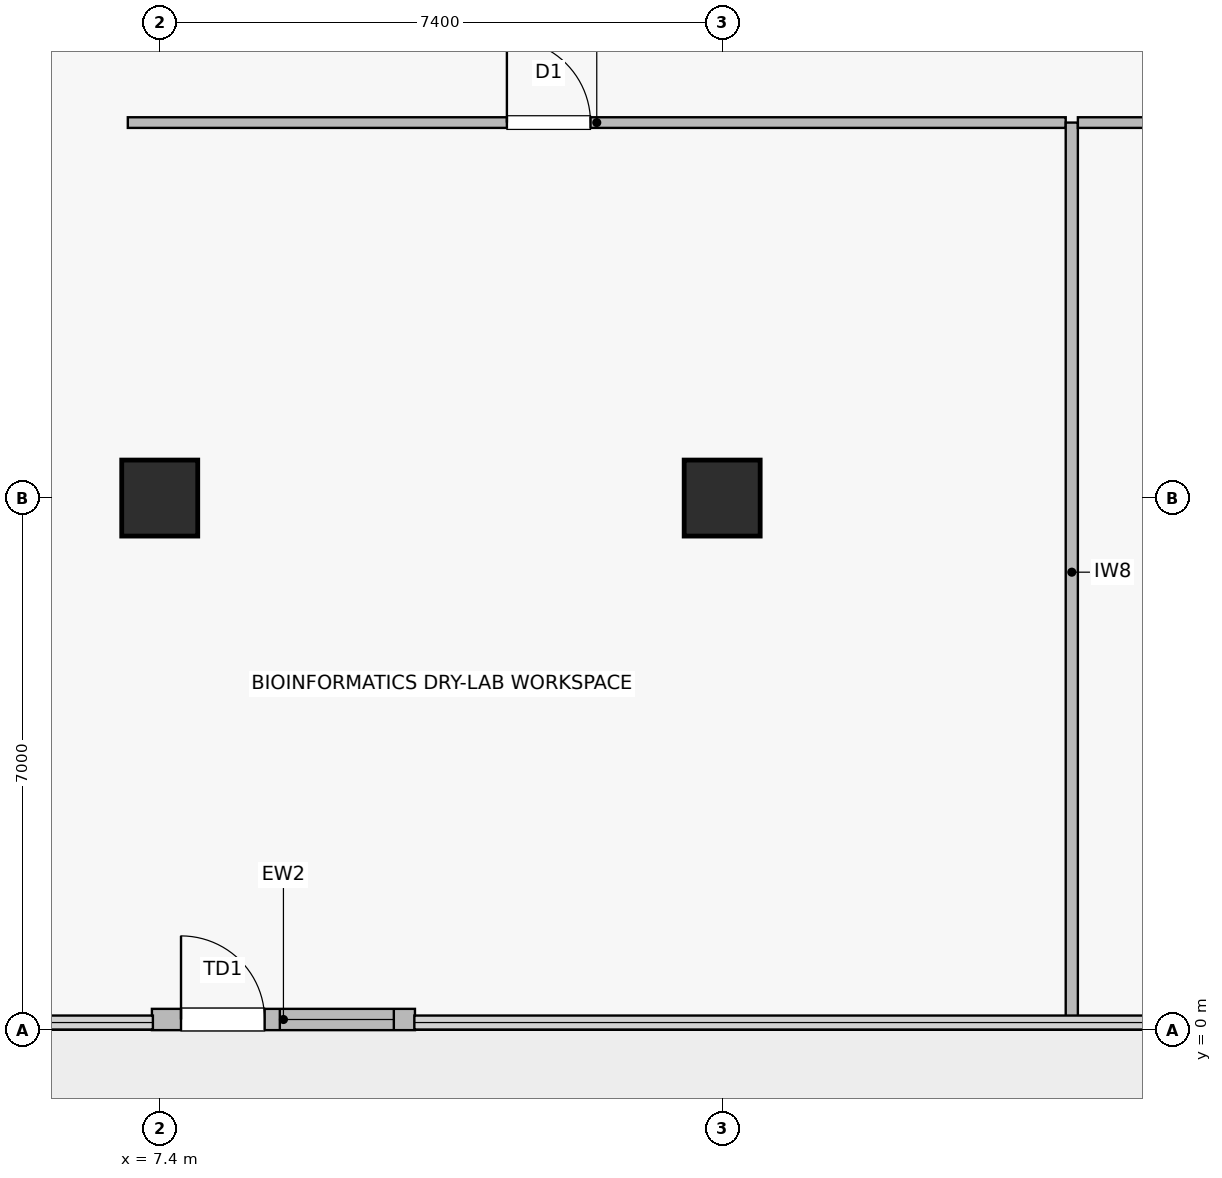
"""IFC4 building model, lengths in metres.
Left out: names, types, materials, properties, quantities, classifications, styles, units other than length and angle.
Written with IfcOpenShell. Run it as: python <this file> out.ifc"""

import sys

from ifc_helpers import new_model, si_unit, direction, frame, frame_2d, origin, origin_2d, place, context, subcontext, project, spatial, rectangle, extrude, source, transform, mapped, element, fill, save


model = new_model("IFC4")
c1 = context("Model", 3, precision=1e-05, world=origin(), true_north=direction((0.0, 1.0)))
c2 = subcontext(c1, "Body", "Model", "MODEL_VIEW")
j1 = project(units=[si_unit("LENGTHUNIT", "METRE"), si_unit("PLANEANGLEUNIT", "RADIAN")], contexts=[c1])
p1 = place(None, origin())
s1 = spatial("IfcSite", under=j1, at=p1, CompositionType="ELEMENT")
p2 = place(p1, origin())
s2 = spatial("IfcBuilding", under=s1, at=p2, CompositionType="ELEMENT")
p3 = place(p2, frame((0.0, 0.0, 33.4)))
s3 = spatial("IfcBuildingStorey", under=s2, at=p3, CompositionType="ELEMENT", Elevation=33.4)
m1 = source(origin(), c2, "Body", "SweptSolid", [
    extrude(rectangle(XDim=1.0, YDim=1.0, at=origin_2d()), origin(), (0.0, 0.0, 1.0), 4.1),
])
for number, where, z_axis, x_axis in (
    (1, (14.8, 7.0, 0.0), (0.0, 0.0, 1.0), (1.0, 0.0, 0.0)),
    (2, (7.4, 7.0, 0.0), (0.0, 0.0, 1.0), (1.0, 0.0, 0.0)),
):
    element("IfcColumn", number, at=place(p3, frame(where, z_axis=z_axis, x_axis=x_axis)), inside=s3, PredefinedType="COLUMN", context=c2, shape_type="MappedRepresentation", body=[
        mapped(m1, transform((0.0, 0.0, 0.0), scale=1.0)),
    ])
p4 = place(p3, frame((7.297, 0.14, 0.0), z_axis=(0.0, 0.0, 1.0), x_axis=(1.0, 0.0, 0.0)))
e3 = element("IfcWall", 3, at=p4, inside=s3, PredefinedType="STANDARD", context=c2, shape_type="SweptSolid", body=[
    extrude(rectangle(XDim=3.461, YDim=0.28, at=frame_2d((1.73, 0.0))), origin(), (0.0, 0.0, 1.0), 3.78),
])
p5 = place(p4, frame((0.383, 0.0, 0.0)))
e4 = element("IfcOpeningElement", 4, at=p5, cuts=e3, PredefinedType="OPENING", context=c2, shape_type="SweptSolid", body=[
    extrude(rectangle(XDim=1.1, YDim=2.2, at=frame_2d((0.55, 1.1))), frame((0.0, 0.15, 0.0), z_axis=(0.0, -1.0, 0.0), x_axis=(1.0, 0.0, 0.0)), (0.0, 0.0, 1.0), 0.3),
])
p6 = place(p4, frame((1.683, 0.0, 0.9)))
e5 = element("IfcOpeningElement", 5, at=p6, cuts=e3, PredefinedType="OPENING", context=c2, shape_type="SweptSolid", body=[
    extrude(rectangle(XDim=1.5, YDim=2.2, at=frame_2d((0.75, 1.1))), frame((0.0, 0.15, 0.0), z_axis=(0.0, -1.0, 0.0), x_axis=(1.0, 0.0, 0.0)), (0.0, 0.0, 1.0), 0.3),
])
p7 = place(p3, frame((6.98, 11.94, 0.0), z_axis=(0.0, 0.0, 1.0), x_axis=(1.0, 0.0, 0.0)))
e6 = element("IfcWall", 6, at=p7, inside=s3, PredefinedType="PARTITIONING", context=c2, shape_type="SweptSolid", body=[
    extrude(rectangle(XDim=12.34, YDim=0.14, at=frame_2d((6.17, 0.0))), origin(), (0.0, 0.0, 1.0), 3.065),
])
p8 = place(p7, frame((4.988, 0.0, 0.0)))
e7 = element("IfcOpeningElement", 7, at=p8, cuts=e6, PredefinedType="OPENING", context=c2, shape_type="SweptSolid", body=[
    extrude(rectangle(XDim=1.1, YDim=2.18, at=frame_2d((0.55, 1.09))), frame((0.0, 0.08, 0.0), z_axis=(0.0, -1.0, 0.0), x_axis=(1.0, 0.0, 0.0)), (0.0, 0.0, 1.0), 0.16),
])
p9 = place(p3, frame((19.4, 0.11, 0.0), z_axis=(0.0, 0.0, 1.0), x_axis=(0.0, 1.0, 0.0)))
e8 = element("IfcWall", 8, at=p9, inside=s3, PredefinedType="PARTITIONING", context=c2, shape_type="SweptSolid", body=[
    extrude(rectangle(XDim=11.83, YDim=0.16, at=frame_2d((5.915, 0.0))), origin(), (0.0, 0.0, 1.0), 3.015),
])
p10 = place(p3, frame((19.48, 11.94, 0.0), z_axis=(0.0, 0.0, 1.0), x_axis=(1.0, 0.0, 0.0)))
e9 = element("IfcWall", 9, at=p10, inside=s3, PredefinedType="PARTITIONING", context=c2, shape_type="SweptSolid", body=[
    extrude(rectangle(XDim=15.04, YDim=0.14, at=frame_2d((7.52, 0.0))), origin(), (0.0, 0.0, 1.0), 3.065),
])
p11 = place(p10, frame((7.764, 0.0, 0.0)))
e10 = element("IfcOpeningElement", 10, at=p11, cuts=e9, PredefinedType="OPENING", context=c2, shape_type="SweptSolid", body=[
    extrude(rectangle(XDim=1.1, YDim=2.18, at=frame_2d((0.55, 1.09))), frame((0.0, 0.08, 0.0), z_axis=(0.0, -1.0, 0.0), x_axis=(1.0, 0.0, 0.0)), (0.0, 0.0, 1.0), 0.16),
])
m2 = source(origin(), c2, "Body", "SweptSolid", [
    extrude(rectangle(XDim=1.1, YDim=2.2, at=frame_2d((0.55, 1.1))), frame((0.0, 0.025, 0.0), z_axis=(0.0, -1.0, 0.0), x_axis=(1.0, 0.0, 0.0)), (0.0, 0.0, 1.0), 0.05),
])
p12 = place(p5, origin())
e11 = element("IfcDoor", 11, at=p12, inside=s3, OperationType="SINGLE_SWING_LEFT", PredefinedType="DOOR", context=c2, shape_type="MappedRepresentation", body=[
    mapped(m2, transform((0.0, 0.0, 0.0), scale=1.0)),
])
fill(e4, e11)
m3 = source(origin(), c2, "Body", "SweptSolid", [
    extrude(rectangle(XDim=1.5, YDim=2.2, at=frame_2d((0.75, 1.1))), frame((0.0, 0.03, 0.0), z_axis=(0.0, -1.0, 0.0), x_axis=(1.0, 0.0, 0.0)), (0.0, 0.0, 1.0), 0.06),
])
p13 = place(p6, origin())
e12 = element("IfcWindow", 12, at=p13, inside=s3, PartitioningType="SINGLE_PANEL", PredefinedType="WINDOW", context=c2, shape_type="MappedRepresentation", body=[
    mapped(m3, transform((0.0, 0.0, 0.0), scale=1.0)),
])
fill(e5, e12)
m4 = source(origin(), c2, "Body", "SweptSolid", [
    extrude(rectangle(XDim=1.1, YDim=2.18, at=frame_2d((0.55, 1.09))), frame((0.0, 0.025, 0.0), z_axis=(0.0, -1.0, 0.0), x_axis=(1.0, 0.0, 0.0)), (0.0, 0.0, 1.0), 0.05),
])
p14 = place(p8, origin())
e13 = element("IfcDoor", 13, at=p14, inside=s3, OperationType="SINGLE_SWING_LEFT", PredefinedType="DOOR", context=c2, shape_type="MappedRepresentation", body=[
    mapped(m4, transform((0.0, 0.0, 0.0), scale=1.0)),
])
fill(e7, e13)
save(model, sys.argv[1])
